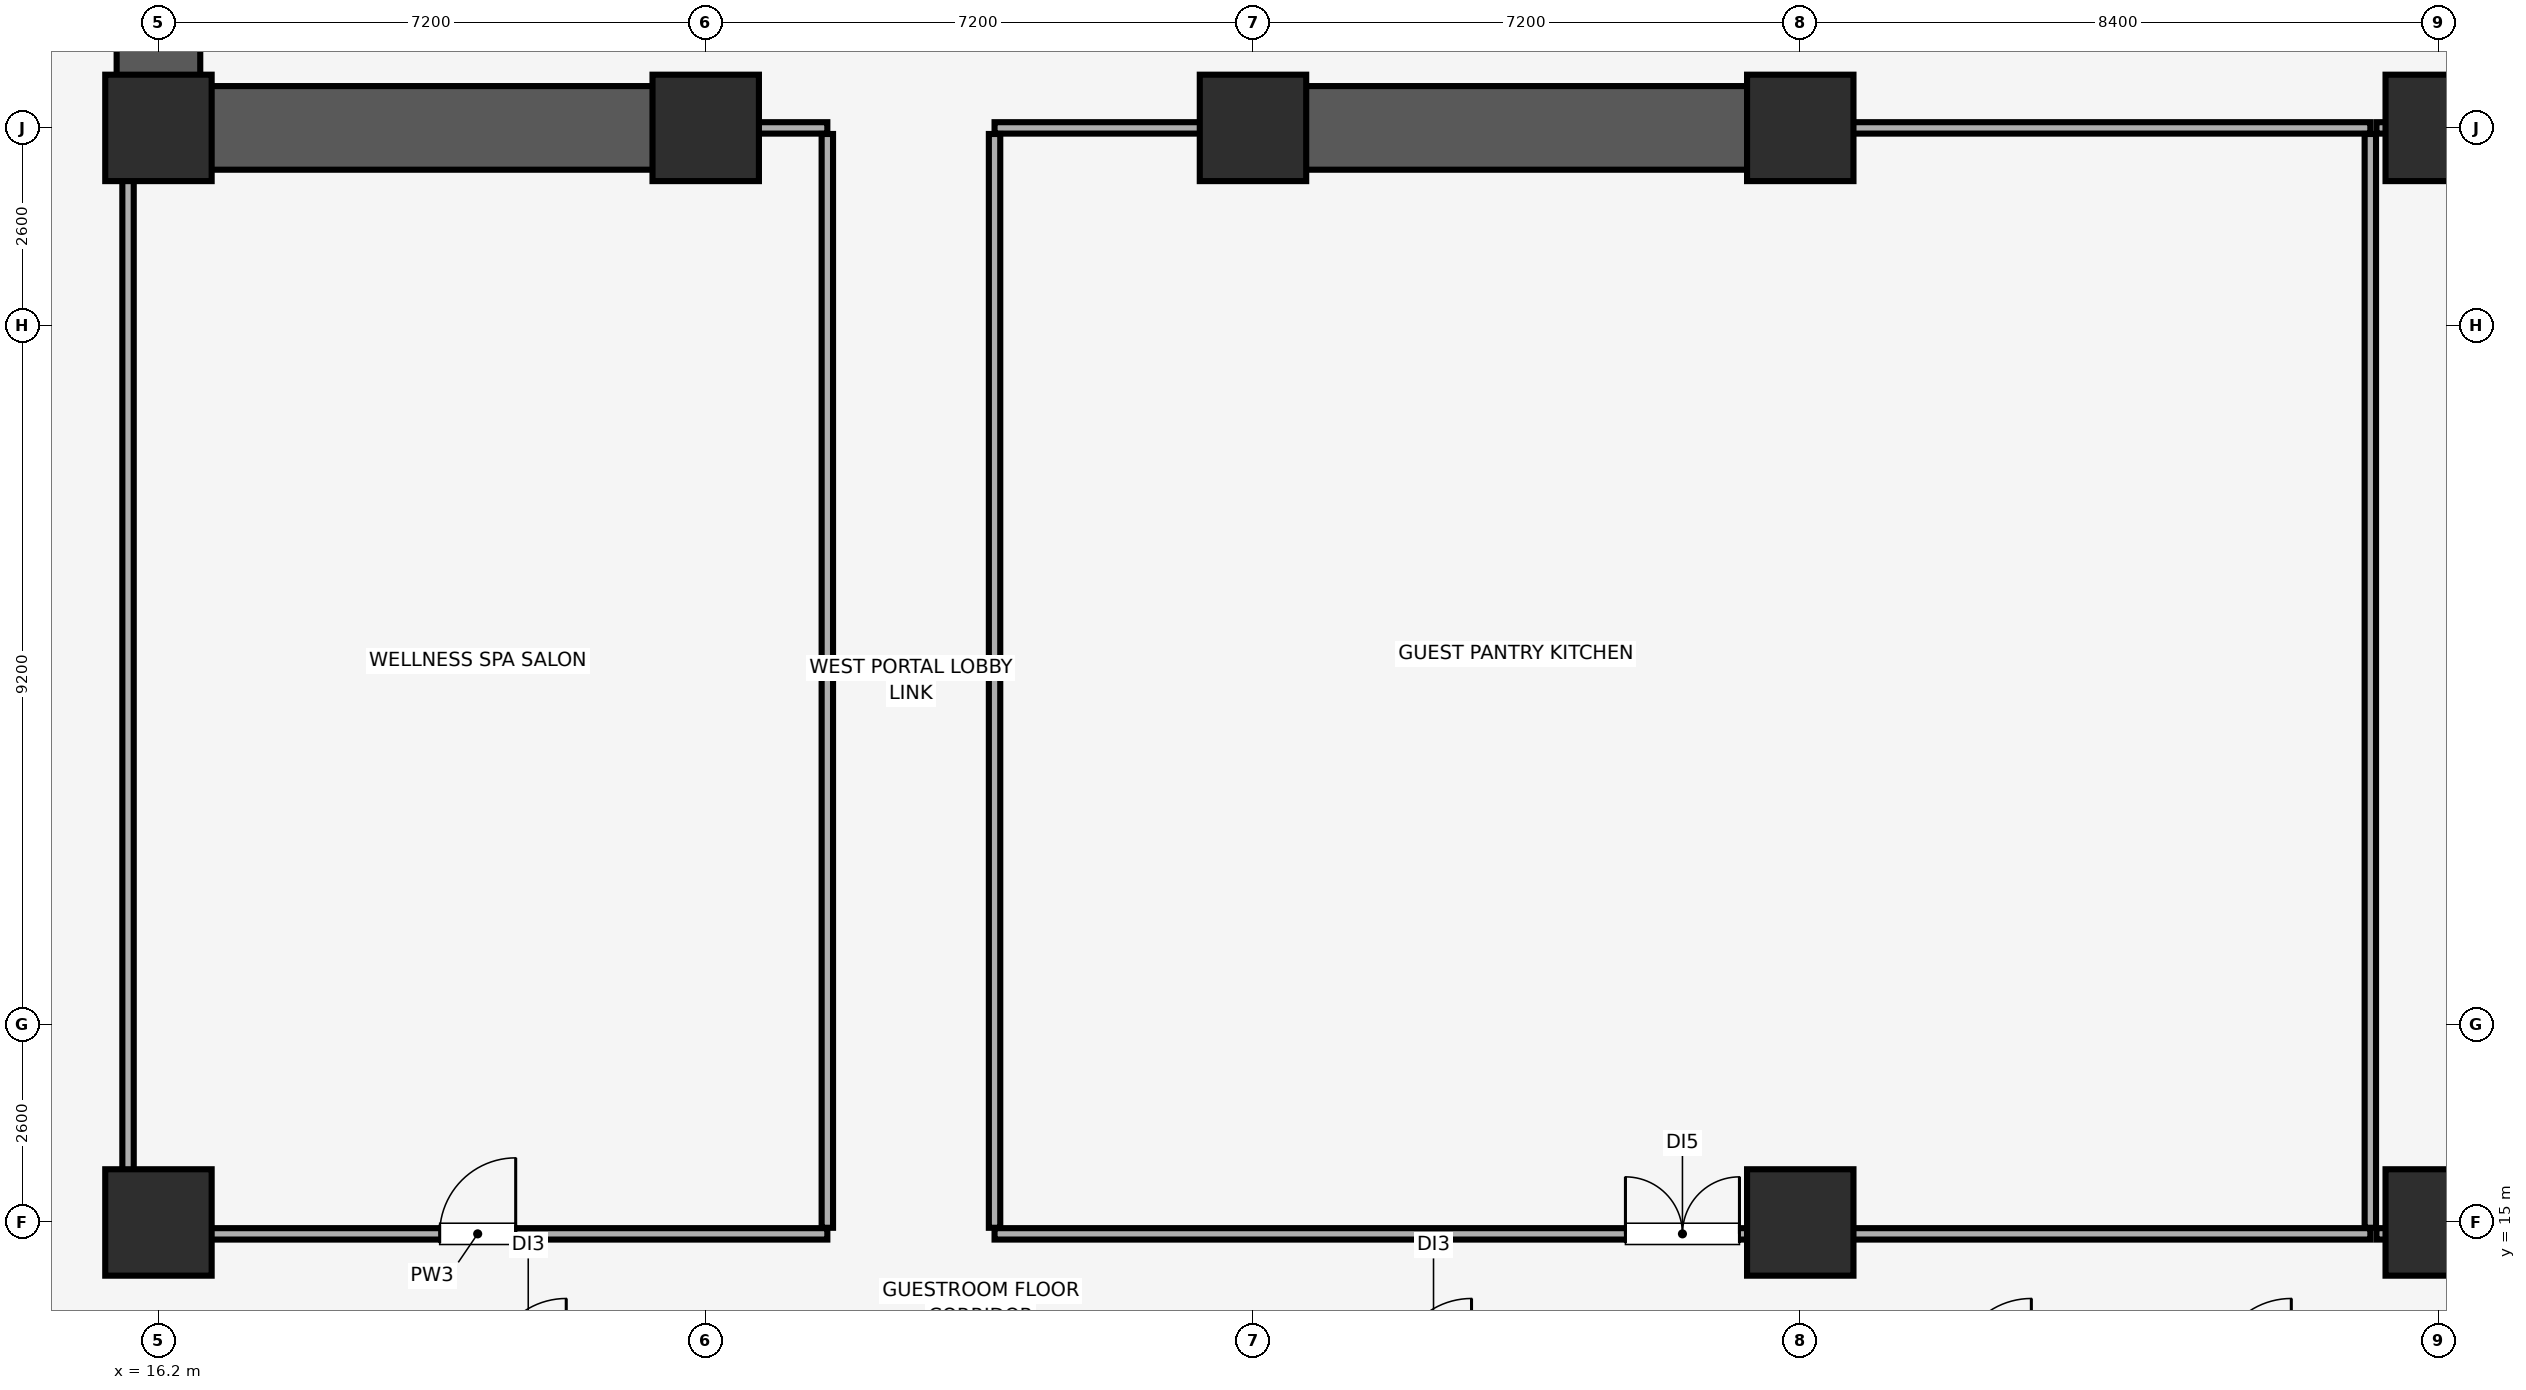
"""IFC4 building model, lengths in metres.
Left out: names, types, materials, properties, quantities, classifications, styles, units other than length and angle.
Written with IfcOpenShell. Run it as: python <this file> out.ifc"""

import sys

from ifc_helpers import new_model, si_unit, direction, frame, frame_2d, origin, origin_2d, place, context, subcontext, project, spatial, rectangle, extrude, element, fill, save


model = new_model("IFC4")
c1 = context("Model", 3, precision=1e-05, world=origin(), true_north=direction((0.0, 1.0)))
c2 = subcontext(c1, "Body", "Model", "MODEL_VIEW")
j1 = project(units=[si_unit("LENGTHUNIT", "METRE"), si_unit("PLANEANGLEUNIT", "RADIAN")], contexts=[c1])
p1 = place(None, origin())
s1 = spatial("IfcSite", under=j1, at=p1, CompositionType="ELEMENT")
p2 = place(p1, origin())
s2 = spatial("IfcBuilding", under=s1, at=p2, CompositionType="ELEMENT")
p3 = place(p2, frame((0.0, 0.0, 68.9)))
s3 = spatial("IfcBuildingStorey", under=s2, at=p3, CompositionType="ELEMENT", Elevation=68.9)
for number, where, z_axis, x_axis in (
    (1, (16.2, 15.0, 0.0), (0.0, 0.0, 1.0), (1.0, 0.0, 0.0)),
    (2, (37.8, 15.0, 0.0), (0.0, 0.0, 1.0), (1.0, 0.0, 0.0)),
    (3, (46.2, 15.0, 0.0), (0.0, 0.0, 1.0), (1.0, 0.0, 0.0)),
    (4, (16.2, 29.4, 0.0), (0.0, 0.0, 1.0), (1.0, 0.0, 0.0)),
    (5, (23.4, 29.4, 0.0), (0.0, 0.0, 1.0), (1.0, 0.0, 0.0)),
    (6, (30.6, 29.4, 0.0), (0.0, 0.0, 1.0), (1.0, 0.0, 0.0)),
    (7, (37.8, 29.4, 0.0), (0.0, 0.0, 1.0), (1.0, 0.0, 0.0)),
    (8, (46.2, 29.4, 0.0), (0.0, 0.0, 1.0), (1.0, 0.0, 0.0)),
):
    element("IfcColumn", number, at=place(p3, frame(where, z_axis=z_axis, x_axis=x_axis)), inside=s3, PredefinedType="COLUMN", context=c2, shape_type="SweptSolid", body=[
        extrude(rectangle(XDim=1.4, YDim=1.4, at=origin_2d()), origin(), (0.0, 0.0, 1.0), 3.51),
    ])
p4 = place(p3, frame((16.2, 29.4, 0.0), z_axis=(0.0, 0.0, 1.0), x_axis=(0.0, 1.0, 0.0)))
e9 = element("IfcWall", 9, at=p4, inside=s3, PredefinedType="SHEAR", context=c2, shape_type="SweptSolid", body=[
    extrude(rectangle(XDim=19.2, YDim=1.1, at=frame_2d((9.6, 0.0))), origin(), (0.0, 0.0, 1.0), 3.51),
])
p5 = place(p3, frame((16.755, 29.4, 0.0), z_axis=(0.0, 0.0, 1.0), x_axis=(1.0, 0.0, 0.0)))
e10 = element("IfcWall", 10, at=p5, inside=s3, PredefinedType="SHEAR", context=c2, shape_type="SweptSolid", body=[
    extrude(rectangle(XDim=6.845, YDim=1.1, at=frame_2d((3.423, 0.0))), origin(), (0.0, 0.0, 1.0), 3.51),
])
for number, where, z_axis, x_axis in (
    (11, (30.4, 29.4, 0.0), (0.0, 0.0, 1.0), (1.0, 0.0, 0.0)),
    (12, (46.0, 29.4, 0.0), (0.0, 0.0, 1.0), (1.0, 0.0, 0.0)),
):
    element("IfcWall", number, at=place(p3, frame(where, z_axis=z_axis, x_axis=x_axis)), inside=s3, PredefinedType="SHEAR", context=c2, shape_type="SweptSolid", body=[
        extrude(rectangle(XDim=7.6, YDim=1.1, at=frame_2d((3.8, 0.0))), origin(), (0.0, 0.0, 1.0), 3.51),
    ])
p6 = place(p3, frame((15.8, 14.85, 0.0), z_axis=(0.0, 0.0, 1.0), x_axis=(1.0, 0.0, 0.0)))
e13 = element("IfcWall", 13, at=p6, inside=s3, PredefinedType="PARTITIONING", context=c2, shape_type="SweptSolid", body=[
    extrude(rectangle(XDim=9.2, YDim=0.15, at=frame_2d((4.6, 0.0))), origin(), (0.0, 0.0, 1.0), 2.86),
])
p7 = place(p6, frame((4.1, 0.0, 0.0)))
e14 = element("IfcOpeningElement", 14, at=p7, cuts=e13, PredefinedType="OPENING", context=c2, shape_type="SweptSolid", body=[
    extrude(rectangle(XDim=1.0, YDim=2.15, at=frame_2d((0.5, 1.075))), frame((0.0, 0.085, 0.0), z_axis=(0.0, -1.0, 0.0), x_axis=(1.0, 0.0, 0.0)), (0.0, 0.0, 1.0), 0.17),
])
p8 = place(p3, frame((23.61, 29.4, 0.0), z_axis=(0.0, 0.0, 1.0), x_axis=(1.0, 0.0, 0.0)))
e15 = element("IfcWall", 15, at=p8, inside=s3, PredefinedType="PARTITIONING", context=c2, shape_type="SweptSolid", body=[
    extrude(rectangle(XDim=1.39, YDim=0.15, at=frame_2d((0.695, 0.0))), origin(), (0.0, 0.0, 1.0), 2.41),
])
p9 = place(p3, frame((15.8, 14.93, 0.0), z_axis=(0.0, 0.0, 1.0), x_axis=(0.0, 1.0, 0.0)))
e16 = element("IfcWall", 16, at=p9, inside=s3, PredefinedType="PARTITIONING", context=c2, shape_type="SweptSolid", body=[
    extrude(rectangle(XDim=14.46, YDim=0.15, at=frame_2d((7.23, 0.0))), origin(), (0.0, 0.0, 1.0), 3.51),
])
p10 = place(p3, frame((25.0, 14.93, 0.0), z_axis=(0.0, 0.0, 1.0), x_axis=(0.0, 1.0, 0.0)))
e17 = element("IfcWall", 17, at=p10, inside=s3, PredefinedType="PARTITIONING", context=c2, shape_type="SweptSolid", body=[
    extrude(rectangle(XDim=14.39, YDim=0.15, at=frame_2d((7.195, 0.0))), origin(), (0.0, 0.0, 1.0), 3.51),
])
p11 = place(p3, frame((27.2, 14.85, 0.0), z_axis=(0.0, 0.0, 1.0), x_axis=(1.0, 0.0, 0.0)))
e18 = element("IfcWall", 18, at=p11, inside=s3, PredefinedType="PARTITIONING", context=c2, shape_type="SweptSolid", body=[
    extrude(rectangle(XDim=18.1, YDim=0.15, at=frame_2d((9.05, 0.0))), origin(), (0.0, 0.0, 1.0), 2.86),
])
p12 = place(p11, frame((8.3, 0.0, 0.0)))
e19 = element("IfcOpeningElement", 19, at=p12, cuts=e18, PredefinedType="OPENING", context=c2, shape_type="SweptSolid", body=[
    extrude(rectangle(XDim=1.5, YDim=2.25, at=frame_2d((0.75, 1.125))), frame((0.0, 0.085, 0.0), z_axis=(0.0, -1.0, 0.0), x_axis=(1.0, 0.0, 0.0)), (0.0, 0.0, 1.0), 0.17),
])
p13 = place(p3, frame((27.2, 29.4, 0.0), z_axis=(0.0, 0.0, 1.0), x_axis=(1.0, 0.0, 0.0)))
e20 = element("IfcWall", 20, at=p13, inside=s3, PredefinedType="PARTITIONING", context=c2, shape_type="SweptSolid", body=[
    extrude(rectangle(XDim=3.19, YDim=0.15, at=frame_2d((1.595, 0.0))), origin(), (0.0, 0.0, 1.0), 2.41),
])
p14 = place(p3, frame((38.01, 29.4, 0.0), z_axis=(0.0, 0.0, 1.0), x_axis=(1.0, 0.0, 0.0)))
e21 = element("IfcWall", 21, at=p14, inside=s3, PredefinedType="PARTITIONING", context=c2, shape_type="SweptSolid", body=[
    extrude(rectangle(XDim=7.29, YDim=0.15, at=frame_2d((3.645, 0.0))), origin(), (0.0, 0.0, 1.0), 2.41),
])
p15 = place(p3, frame((27.2, 14.93, 0.0), z_axis=(0.0, 0.0, 1.0), x_axis=(0.0, 1.0, 0.0)))
e22 = element("IfcWall", 22, at=p15, inside=s3, PredefinedType="PARTITIONING", context=c2, shape_type="SweptSolid", body=[
    extrude(rectangle(XDim=14.39, YDim=0.15, at=frame_2d((7.195, 0.0))), origin(), (0.0, 0.0, 1.0), 2.977),
])
p16 = place(p3, frame((45.3, 14.93, 0.0), z_axis=(0.0, 0.0, 1.0), x_axis=(0.0, 1.0, 0.0)))
e23 = element("IfcWall", 23, at=p16, inside=s3, PredefinedType="PARTITIONING", context=c2, shape_type="SweptSolid", body=[
    extrude(rectangle(XDim=14.39, YDim=0.15, at=frame_2d((7.195, 0.0))), origin(), (0.0, 0.0, 1.0), 3.51),
])
p17 = place(p3, frame((45.38, 14.85, 0.0), z_axis=(0.0, 0.0, 1.0), x_axis=(1.0, 0.0, 0.0)))
e24 = element("IfcWall", 24, at=p17, inside=s3, PredefinedType="PARTITIONING", context=c2, shape_type="SweptSolid", body=[
    extrude(rectangle(XDim=11.42, YDim=0.15, at=frame_2d((5.71, 0.0))), origin(), (0.0, 0.0, 1.0), 2.86),
])
p18 = place(p17, frame((5.17, 0.0, 0.0)))
e25 = element("IfcOpeningElement", 25, at=p18, cuts=e24, PredefinedType="OPENING", context=c2, shape_type="SweptSolid", body=[
    extrude(rectangle(XDim=1.0, YDim=2.15, at=frame_2d((0.5, 1.075))), frame((0.0, 0.085, 0.0), z_axis=(0.0, -1.0, 0.0), x_axis=(1.0, 0.0, 0.0)), (0.0, 0.0, 1.0), 0.17),
])
p19 = place(p3, frame((45.38, 29.4, 0.0), z_axis=(0.0, 0.0, 1.0), x_axis=(1.0, 0.0, 0.0)))
e26 = element("IfcWall", 26, at=p19, inside=s3, PredefinedType="PARTITIONING", context=c2, shape_type="SweptSolid", body=[
    extrude(rectangle(XDim=0.61, YDim=0.15, at=frame_2d((0.305, 0.0))), origin(), (0.0, 0.0, 1.0), 2.41),
])
p20 = place(p7, origin())
e27 = element("IfcDoor", 27, at=p20, inside=s3, OperationType="SINGLE_SWING_RIGHT", PredefinedType="DOOR", context=c2, shape_type="SweptSolid", body=[
    extrude(rectangle(XDim=1.0, YDim=2.15, at=frame_2d((0.5, 1.075))), frame((0.0, 0.025, 0.0), z_axis=(0.0, -1.0, 0.0), x_axis=(1.0, 0.0, 0.0)), (0.0, 0.0, 1.0), 0.05),
])
fill(e14, e27)
p21 = place(p12, origin())
e28 = element("IfcDoor", 28, at=p21, inside=s3, OperationType="DOUBLE_DOOR_SINGLE_SWING", PredefinedType="DOOR", context=c2, shape_type="SweptSolid", body=[
    extrude(rectangle(XDim=1.5, YDim=2.25, at=frame_2d((0.75, 1.125))), frame((0.0, 0.025, 0.0), z_axis=(0.0, -1.0, 0.0), x_axis=(1.0, 0.0, 0.0)), (0.0, 0.0, 1.0), 0.05),
])
fill(e19, e28)
save(model, sys.argv[1])
